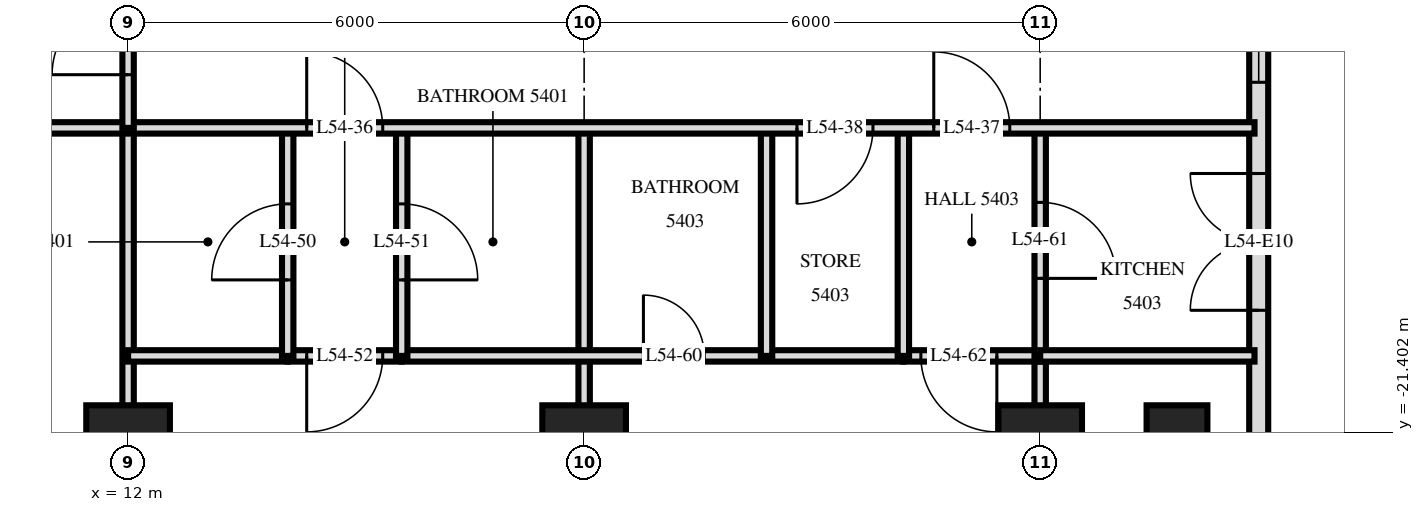
"""IFC4 building model, lengths in metres.
Left out: names, types, materials, properties, quantities, classifications, styles, units other than length and angle.
Written with IfcOpenShell. Run it as: python <this file> out.ifc"""

import sys

from ifc_helpers import new_model, si_unit, direction, frame, frame_2d, origin, origin_2d, place, context, subcontext, project, spatial, rectangle, extrude, element, fill, save


model = new_model("IFC4")
c1 = context("Model", 3, precision=1e-05, world=origin(), true_north=direction((0.0, 1.0)))
c2 = subcontext(c1, "Body", "Model", "MODEL_VIEW")
j1 = project(units=[si_unit("LENGTHUNIT", "METRE"), si_unit("PLANEANGLEUNIT", "RADIAN")], contexts=[c1])
p1 = place(None, origin())
s1 = spatial("IfcSite", under=j1, at=p1, CompositionType="ELEMENT")
p2 = place(p1, origin())
s2 = spatial("IfcBuilding", under=s1, at=p2, CompositionType="ELEMENT")
p3 = place(p2, frame((0.0, 0.0, 208.1)))
s3 = spatial("IfcBuildingStorey", under=s2, at=p3, CompositionType="ELEMENT", Elevation=208.1)
for number, where, z_axis, x_axis in (
    (1, (12.0, -21.6, 0.0), (0.0, 0.0, 1.0), (1.0, 0.0, 0.0)),
    (2, (18.0, -21.6, 0.0), (0.0, 0.0, 1.0), (1.0, 0.0, 0.0)),
    (3, (24.0, -21.6, 0.0), (0.0, 0.0, 1.0), (1.0, 0.0, 0.0)),
):
    element("IfcColumn", number, at=place(p3, frame(where, z_axis=z_axis, x_axis=x_axis)), inside=s3, PredefinedType="COLUMN", context=c2, shape_type="SweptSolid", body=[
        extrude(rectangle(XDim=1.1, YDim=1.1, at=origin_2d()), origin(), (0.0, 0.0, 1.0), 3.5),
    ])
p4 = place(p3, frame((25.8, -21.6, 0.0), z_axis=(0.0, 0.0, 1.0), x_axis=(0.0, 1.0, 0.0)))
e4 = element("IfcColumn", 4, at=p4, inside=s3, PredefinedType="COLUMN", context=c2, shape_type="SweptSolid", body=[
    extrude(rectangle(XDim=1.1, YDim=0.8, at=origin_2d()), origin(), (0.0, 0.0, 1.0), 3.5),
])
p5 = place(p3, frame((26.875, -24.875, 0.0), z_axis=(0.0, 0.0, 1.0), x_axis=(0.0, 1.0, 0.0)))
e5 = element("IfcWall", 5, at=p5, inside=s3, PredefinedType="SOLIDWALL", context=c2, shape_type="SweptSolid", body=[
    extrude(rectangle(XDim=21.551, YDim=0.25, at=frame_2d((10.775, 0.0))), origin(), (0.0, 0.0, 1.0), 3.22),
])
p6 = place(p5, frame((0.575, 0.0, 0.0)))
e6 = element("IfcOpeningElement", 6, at=p6, cuts=e5, PredefinedType="OPENING", context=c2, shape_type="SweptSolid", body=[
    extrude(rectangle(XDim=1.8, YDim=2.4, at=frame_2d((0.9, 1.2))), frame((0.0, 0.135, 0.0), z_axis=(0.0, -1.0, 0.0), x_axis=(1.0, 0.0, 0.0)), (0.0, 0.0, 1.0), 0.27),
])
p7 = place(p5, frame((5.075, 0.0, 0.0)))
e7 = element("IfcOpeningElement", 7, at=p7, cuts=e5, PredefinedType="OPENING", context=c2, shape_type="SweptSolid", body=[
    extrude(rectangle(XDim=1.8, YDim=2.4, at=frame_2d((0.9, 1.2))), frame((0.0, 0.135, 0.0), z_axis=(0.0, -1.0, 0.0), x_axis=(1.0, 0.0, 0.0)), (0.0, 0.0, 1.0), 0.27),
])
p8 = place(p5, frame((8.075, 0.0, 0.9)))
e8 = element("IfcOpeningElement", 8, at=p8, cuts=e5, PredefinedType="OPENING", context=c2, shape_type="SweptSolid", body=[
    extrude(rectangle(XDim=1.2, YDim=1.5, at=frame_2d((0.6, 0.75))), frame((0.0, 0.135, 0.0), z_axis=(0.0, -1.0, 0.0), x_axis=(1.0, 0.0, 0.0)), (0.0, 0.0, 1.0), 0.27),
])
p9 = place(p5, frame((13.1, 0.0, 0.0)))
e9 = element("IfcOpeningElement", 9, at=p9, cuts=e5, PredefinedType="OPENING", context=c2, shape_type="SweptSolid", body=[
    extrude(rectangle(XDim=1.8, YDim=2.4, at=frame_2d((0.9, 1.2))), frame((0.0, 0.135, 0.0), z_axis=(0.0, -1.0, 0.0), x_axis=(1.0, 0.0, 0.0)), (0.0, 0.0, 1.0), 0.27),
])
p10 = place(p3, frame((24.0, -20.4, 0.0), z_axis=(0.0, 0.0, 1.0), x_axis=(0.0, 1.0, 0.0)))
e10 = element("IfcWall", 10, at=p10, inside=s3, PredefinedType="PARTITIONING", context=c2, shape_type="SweptSolid", body=[
    extrude(rectangle(XDim=3.0, YDim=0.15, at=frame_2d((1.5, 0.0))), origin(), (0.0, 0.0, 1.0), 3.22),
])
p11 = place(p10, frame((1.02, 0.0, 0.0)))
e11 = element("IfcOpeningElement", 11, at=p11, cuts=e10, PredefinedType="OPENING", context=c2, shape_type="SweptSolid", body=[
    extrude(rectangle(XDim=1.0, YDim=2.1, at=frame_2d((0.5, 1.05))), frame((0.0, 0.085, 0.0), z_axis=(0.0, -1.0, 0.0), x_axis=(1.0, 0.0, 0.0)), (0.0, 0.0, 1.0), 0.17),
])
p12 = place(p3, frame((24.0, -28.918, 0.0), z_axis=(0.0, 0.0, 1.0), x_axis=(0.0, 1.0, 0.0)))
e12 = element("IfcWall", 12, at=p12, inside=s3, PredefinedType="PARTITIONING", context=c2, shape_type="SweptSolid", body=[
    extrude(rectangle(XDim=8.518, YDim=0.15, at=frame_2d((4.259, 0.0))), origin(), (0.0, 0.0, 1.0), 3.22),
])
p13 = place(p12, frame((3.698, 0.0, 0.0)))
e13 = element("IfcOpeningElement", 13, at=p13, cuts=e12, PredefinedType="OPENING", context=c2, shape_type="SweptSolid", body=[
    extrude(rectangle(XDim=0.9, YDim=2.1, at=frame_2d((0.45, 1.05))), frame((0.0, 0.085, 0.0), z_axis=(0.0, -1.0, 0.0), x_axis=(1.0, 0.0, 0.0)), (0.0, 0.0, 1.0), 0.17),
])
for number, where, z_axis, x_axis in (
    (14, (22.2, -20.4, 0.0), (0.0, 0.0, 1.0), (0.0, 1.0, 0.0)),
    (15, (20.4, -20.4, 0.0), (0.0, 0.0, 1.0), (0.0, 1.0, 0.0)),
):
    element("IfcWall", number, at=place(p3, frame(where, z_axis=z_axis, x_axis=x_axis)), inside=s3, PredefinedType="PARTITIONING", context=c2, shape_type="SweptSolid", body=[
        extrude(rectangle(XDim=3.0, YDim=0.15, at=frame_2d((1.5, 0.0))), origin(), (0.0, 0.0, 1.0), 3.22),
    ])
p14 = place(p3, frame((18.0, -29.22, 0.0), z_axis=(0.0, 0.0, 1.0), x_axis=(0.0, 1.0, 0.0)))
e16 = element("IfcWall", 16, at=p14, inside=s3, PredefinedType="PARTITIONING", context=c2, shape_type="SweptSolid", body=[
    extrude(rectangle(XDim=11.82, YDim=0.15, at=frame_2d((5.91, 0.0))), origin(), (0.0, 0.0, 1.0), 3.22),
])
p15 = place(p3, frame((15.6, -20.4, 0.0), z_axis=(0.0, 0.0, 1.0), x_axis=(0.0, 1.0, 0.0)))
e17 = element("IfcWall", 17, at=p15, inside=s3, PredefinedType="PARTITIONING", context=c2, shape_type="SweptSolid", body=[
    extrude(rectangle(XDim=3.0, YDim=0.15, at=frame_2d((1.5, 0.0))), origin(), (0.0, 0.0, 1.0), 3.22),
])
p16 = place(p15, frame((1.0, 0.0, 0.0)))
e18 = element("IfcOpeningElement", 18, at=p16, cuts=e17, PredefinedType="OPENING", context=c2, shape_type="SweptSolid", body=[
    extrude(rectangle(XDim=1.0, YDim=2.1, at=frame_2d((0.5, 1.05))), frame((0.0, 0.085, 0.0), z_axis=(0.0, -1.0, 0.0), x_axis=(1.0, 0.0, 0.0)), (0.0, 0.0, 1.0), 0.17),
])
p17 = place(p3, frame((14.1, -20.4, 0.0), z_axis=(0.0, 0.0, 1.0), x_axis=(0.0, 1.0, 0.0)))
e19 = element("IfcWall", 19, at=p17, inside=s3, PredefinedType="PARTITIONING", context=c2, shape_type="SweptSolid", body=[
    extrude(rectangle(XDim=3.0, YDim=0.15, at=frame_2d((1.5, 0.0))), origin(), (0.0, 0.0, 1.0), 3.22),
])
p18 = place(p17, frame((1.0, 0.0, 0.0)))
e20 = element("IfcOpeningElement", 20, at=p18, cuts=e19, PredefinedType="OPENING", context=c2, shape_type="SweptSolid", body=[
    extrude(rectangle(XDim=1.0, YDim=2.1, at=frame_2d((0.5, 1.05))), frame((0.0, 0.085, 0.0), z_axis=(0.0, -1.0, 0.0), x_axis=(1.0, 0.0, 0.0)), (0.0, 0.0, 1.0), 0.17),
])
p19 = place(p3, frame((12.0, -17.4, 0.0), z_axis=(0.0, 0.0, 1.0), x_axis=(0.0, 1.0, 0.0)))
e21 = element("IfcWall", 21, at=p19, inside=s3, PredefinedType="PARTITIONING", context=c2, shape_type="SweptSolid", body=[
    extrude(rectangle(XDim=2.35, YDim=0.15, at=frame_2d((1.175, 0.0))), origin(), (0.0, 0.0, 1.0), 3.22),
])
p20 = place(p19, frame((0.7, 0.0, 0.0)))
e22 = element("IfcOpeningElement", 22, at=p20, cuts=e21, PredefinedType="OPENING", context=c2, shape_type="SweptSolid", body=[
    extrude(rectangle(XDim=1.0, YDim=2.1, at=frame_2d((0.5, 1.05))), frame((0.0, 0.085, 0.0), z_axis=(0.0, -1.0, 0.0), x_axis=(1.0, 0.0, 0.0)), (0.0, 0.0, 1.0), 0.17),
])
p21 = place(p3, frame((12.0, -29.22, 0.0), z_axis=(0.0, 0.0, 1.0), x_axis=(0.0, 1.0, 0.0)))
e23 = element("IfcWall", 23, at=p21, inside=s3, PredefinedType="PARTITIONING", context=c2, shape_type="SweptSolid", body=[
    extrude(rectangle(XDim=11.82, YDim=0.15, at=frame_2d((5.91, 0.0))), origin(), (0.0, 0.0, 1.0), 3.22),
])
p22 = place(p3, frame((14.1, -20.4, 0.0), z_axis=(0.0, 0.0, 1.0), x_axis=(1.0, 0.0, 0.0)))
e24 = element("IfcWall", 24, at=p22, inside=s3, PredefinedType="PARTITIONING", context=c2, shape_type="SweptSolid", body=[
    extrude(rectangle(XDim=1.5, YDim=0.15, at=frame_2d((0.75, 0.0))), origin(), (0.0, 0.0, 1.0), 3.22),
])
p23 = place(p22, frame((0.25, 0.0, 0.0)))
e25 = element("IfcOpeningElement", 25, at=p23, cuts=e24, PredefinedType="OPENING", context=c2, shape_type="SweptSolid", body=[
    extrude(rectangle(XDim=1.0, YDim=2.1, at=frame_2d((0.5, 1.05))), frame((0.0, 0.085, 0.0), z_axis=(0.0, -1.0, 0.0), x_axis=(1.0, 0.0, 0.0)), (0.0, 0.0, 1.0), 0.17),
])
p24 = place(p3, frame((22.2, -20.4, 0.0), z_axis=(0.0, 0.0, 1.0), x_axis=(1.0, 0.0, 0.0)))
e26 = element("IfcWall", 26, at=p24, inside=s3, PredefinedType="PARTITIONING", context=c2, shape_type="SweptSolid", body=[
    extrude(rectangle(XDim=1.8, YDim=0.15, at=frame_2d((0.9, 0.0))), origin(), (0.0, 0.0, 1.0), 3.22),
])
p25 = place(p24, frame((0.23, 0.0, 0.0)))
e27 = element("IfcOpeningElement", 27, at=p25, cuts=e26, PredefinedType="OPENING", context=c2, shape_type="SweptSolid", body=[
    extrude(rectangle(XDim=1.0, YDim=2.1, at=frame_2d((0.5, 1.05))), frame((0.0, 0.085, 0.0), z_axis=(0.0, -1.0, 0.0), x_axis=(1.0, 0.0, 0.0)), (0.0, 0.0, 1.0), 0.17),
])
p26 = place(p3, frame((12.0, -20.4, 0.0), z_axis=(0.0, 0.0, 1.0), x_axis=(1.0, 0.0, 0.0)))
e28 = element("IfcWall", 28, at=p26, inside=s3, PredefinedType="PARTITIONING", context=c2, shape_type="SweptSolid", body=[
    extrude(rectangle(XDim=2.1, YDim=0.15, at=frame_2d((1.05, 0.0))), origin(), (0.0, 0.0, 1.0), 3.22),
])
p27 = place(p3, frame((15.6, -20.4, 0.0), z_axis=(0.0, 0.0, 1.0), x_axis=(1.0, 0.0, 0.0)))
e29 = element("IfcWall", 29, at=p27, inside=s3, PredefinedType="PARTITIONING", context=c2, shape_type="SweptSolid", body=[
    extrude(rectangle(XDim=6.6, YDim=0.15, at=frame_2d((3.3, 0.0))), origin(), (0.0, 0.0, 1.0), 3.22),
])
p28 = place(p27, frame((3.18, 0.0, 0.0)))
e30 = element("IfcOpeningElement", 30, at=p28, cuts=e29, PredefinedType="OPENING", context=c2, shape_type="SweptSolid", body=[
    extrude(rectangle(XDim=0.8, YDim=2.1, at=frame_2d((0.4, 1.05))), frame((0.0, 0.085, 0.0), z_axis=(0.0, -1.0, 0.0), x_axis=(1.0, 0.0, 0.0)), (0.0, 0.0, 1.0), 0.17),
])
p29 = place(p3, frame((24.0, -20.4, 0.0), z_axis=(0.0, 0.0, 1.0), x_axis=(1.0, 0.0, 0.0)))
e31 = element("IfcWall", 31, at=p29, inside=s3, PredefinedType="PARTITIONING", context=c2, shape_type="SweptSolid", body=[
    extrude(rectangle(XDim=2.82, YDim=0.15, at=frame_2d((1.41, 0.0))), origin(), (0.0, 0.0, 1.0), 3.22),
])
p30 = place(p3, frame((-26.82, -17.4, 0.0), z_axis=(0.0, 0.0, 1.0), x_axis=(1.0, 0.0, 0.0)))
e32 = element("IfcWall", 32, at=p30, inside=s3, PredefinedType="PARTITIONING", context=c2, shape_type="SweptSolid", body=[
    extrude(rectangle(XDim=53.64, YDim=0.15, at=frame_2d((26.82, 0.0))), origin(), (0.0, 0.0, 1.0), 3.22),
])
p31 = place(p30, frame((4.92, 0.0, 0.0)))
e33 = element("IfcOpeningElement", 33, at=p31, cuts=e32, PredefinedType="OPENING", context=c2, shape_type="SweptSolid", body=[
    extrude(rectangle(XDim=1.0, YDim=2.1, at=frame_2d((0.5, 1.05))), frame((0.0, 0.085, 0.0), z_axis=(0.0, -1.0, 0.0), x_axis=(1.0, 0.0, 0.0)), (0.0, 0.0, 1.0), 0.17),
])
p32 = place(p30, frame((1.62, 0.0, 0.0)))
e34 = element("IfcOpeningElement", 34, at=p32, cuts=e32, PredefinedType="OPENING", context=c2, shape_type="SweptSolid", body=[
    extrude(rectangle(XDim=1.0, YDim=2.1, at=frame_2d((0.5, 1.05))), frame((0.0, 0.085, 0.0), z_axis=(0.0, -1.0, 0.0), x_axis=(1.0, 0.0, 0.0)), (0.0, 0.0, 1.0), 0.17),
])
p33 = place(p30, frame((41.17, 0.0, 0.0)))
e35 = element("IfcOpeningElement", 35, at=p33, cuts=e32, PredefinedType="OPENING", context=c2, shape_type="SweptSolid", body=[
    extrude(rectangle(XDim=1.0, YDim=2.1, at=frame_2d((0.5, 1.05))), frame((0.0, 0.085, 0.0), z_axis=(0.0, -1.0, 0.0), x_axis=(1.0, 0.0, 0.0)), (0.0, 0.0, 1.0), 0.17),
])
p34 = place(p30, frame((49.42, 0.0, 0.0)))
e36 = element("IfcOpeningElement", 36, at=p34, cuts=e32, PredefinedType="OPENING", context=c2, shape_type="SweptSolid", body=[
    extrude(rectangle(XDim=1.0, YDim=2.1, at=frame_2d((0.5, 1.05))), frame((0.0, 0.085, 0.0), z_axis=(0.0, -1.0, 0.0), x_axis=(1.0, 0.0, 0.0)), (0.0, 0.0, 1.0), 0.17),
])
p35 = place(p30, frame((47.62, 0.0, 0.0)))
e37 = element("IfcOpeningElement", 37, at=p35, cuts=e32, PredefinedType="OPENING", context=c2, shape_type="SweptSolid", body=[
    extrude(rectangle(XDim=1.0, YDim=2.1, at=frame_2d((0.5, 1.05))), frame((0.0, 0.085, 0.0), z_axis=(0.0, -1.0, 0.0), x_axis=(1.0, 0.0, 0.0)), (0.0, 0.0, 1.0), 0.17),
])
p36 = place(p30, frame((21.82, 0.0, 0.0)))
e38 = element("IfcOpeningElement", 38, at=p36, cuts=e32, PredefinedType="OPENING", context=c2, shape_type="SweptSolid", body=[
    extrude(rectangle(XDim=1.0, YDim=2.1, at=frame_2d((0.5, 1.05))), frame((0.0, 0.085, 0.0), z_axis=(0.0, -1.0, 0.0), x_axis=(1.0, 0.0, 0.0)), (0.0, 0.0, 1.0), 0.17),
])
p37 = place(p30, frame((33.82, 0.0, 0.0)))
e39 = element("IfcOpeningElement", 39, at=p37, cuts=e32, PredefinedType="OPENING", context=c2, shape_type="SweptSolid", body=[
    extrude(rectangle(XDim=1.0, YDim=2.1, at=frame_2d((0.5, 1.05))), frame((0.0, 0.085, 0.0), z_axis=(0.0, -1.0, 0.0), x_axis=(1.0, 0.0, 0.0)), (0.0, 0.0, 1.0), 0.17),
])
p38 = place(p7, origin())
e40 = element("IfcDoor", 40, at=p38, inside=s3, OperationType="DOUBLE_DOOR_SINGLE_SWING", PredefinedType="DOOR", context=c2, shape_type="SweptSolid", body=[
    extrude(rectangle(XDim=1.8, YDim=2.4, at=frame_2d((0.9, 1.2))), frame((0.0, 0.025, 0.0), z_axis=(0.0, -1.0, 0.0), x_axis=(1.0, 0.0, 0.0)), (0.0, 0.0, 1.0), 0.05),
])
fill(e7, e40)
p39 = place(p8, origin())
e41 = element("IfcWindow", 41, at=p39, inside=s3, PartitioningType="SINGLE_PANEL", PredefinedType="WINDOW", context=c2, shape_type="SweptSolid", body=[
    extrude(rectangle(XDim=1.2, YDim=1.5, at=frame_2d((0.6, 0.75))), frame((0.0, 0.03, 0.0), z_axis=(0.0, -1.0, 0.0), x_axis=(1.0, 0.0, 0.0)), (0.0, 0.0, 1.0), 0.06),
])
fill(e8, e41)
p40 = place(p20, origin())
e42 = element("IfcDoor", 42, at=p40, inside=s3, OperationType="SINGLE_SWING_RIGHT", PredefinedType="DOOR", context=c2, shape_type="SweptSolid", body=[
    extrude(rectangle(XDim=1.0, YDim=2.1, at=frame_2d((0.5, 1.05))), frame((0.0, 0.025, 0.0), z_axis=(0.0, -1.0, 0.0), x_axis=(1.0, 0.0, 0.0)), (0.0, 0.0, 1.0), 0.05),
])
fill(e22, e42)
p41 = place(p33, origin())
e43 = element("IfcDoor", 43, at=p41, inside=s3, OperationType="SINGLE_SWING_RIGHT", PredefinedType="DOOR", context=c2, shape_type="SweptSolid", body=[
    extrude(rectangle(XDim=1.0, YDim=2.1, at=frame_2d((0.5, 1.05))), frame((0.0, 0.025, 0.0), z_axis=(0.0, -1.0, 0.0), x_axis=(1.0, 0.0, 0.0)), (0.0, 0.0, 1.0), 0.05),
])
fill(e35, e43)
p42 = place(p34, origin())
e44 = element("IfcDoor", 44, at=p42, inside=s3, OperationType="SINGLE_SWING_RIGHT", PredefinedType="DOOR", context=c2, shape_type="SweptSolid", body=[
    extrude(rectangle(XDim=1.0, YDim=2.1, at=frame_2d((0.5, 1.05))), frame((0.0, 0.025, 0.0), z_axis=(0.0, -1.0, 0.0), x_axis=(1.0, 0.0, 0.0)), (0.0, 0.0, 1.0), 0.05),
])
fill(e36, e44)
p43 = place(p35, frame((0.5, 0.0, 0.0), z_axis=(0.0, 0.0, 1.0), x_axis=(-1.0, 0.0, 0.0)))
e45 = element("IfcDoor", 45, at=p43, inside=s3, OperationType="SINGLE_SWING_LEFT", PredefinedType="DOOR", context=c2, shape_type="SweptSolid", body=[
    extrude(rectangle(XDim=1.0, YDim=2.1, at=frame_2d((0.0, 1.05))), frame((0.0, -0.025, 0.0), z_axis=(0.0, 1.0, 0.0), x_axis=(-1.0, 0.0, 0.0)), (0.0, 0.0, 1.0), 0.05),
])
fill(e37, e45)
p44 = place(p18, origin())
e46 = element("IfcDoor", 46, at=p44, inside=s3, OperationType="SINGLE_SWING_RIGHT", PredefinedType="DOOR", context=c2, shape_type="SweptSolid", body=[
    extrude(rectangle(XDim=1.0, YDim=2.1, at=frame_2d((0.5, 1.05))), frame((0.0, 0.025, 0.0), z_axis=(0.0, -1.0, 0.0), x_axis=(1.0, 0.0, 0.0)), (0.0, 0.0, 1.0), 0.05),
])
fill(e20, e46)
p45 = place(p16, frame((0.5, 0.0, 0.0), z_axis=(0.0, 0.0, 1.0), x_axis=(-1.0, 0.0, 0.0)))
e47 = element("IfcDoor", 47, at=p45, inside=s3, OperationType="SINGLE_SWING_LEFT", PredefinedType="DOOR", context=c2, shape_type="SweptSolid", body=[
    extrude(rectangle(XDim=1.0, YDim=2.1, at=frame_2d((0.0, 1.05))), frame((0.0, -0.025, 0.0), z_axis=(0.0, 1.0, 0.0), x_axis=(-1.0, 0.0, 0.0)), (0.0, 0.0, 1.0), 0.05),
])
fill(e18, e47)
p46 = place(p23, frame((0.5, 0.0, 0.0), z_axis=(0.0, 0.0, 1.0), x_axis=(-1.0, 0.0, 0.0)))
e48 = element("IfcDoor", 48, at=p46, inside=s3, OperationType="SINGLE_SWING_LEFT", PredefinedType="DOOR", context=c2, shape_type="SweptSolid", body=[
    extrude(rectangle(XDim=1.0, YDim=2.1, at=frame_2d((0.0, 1.05))), frame((0.0, -0.025, 0.0), z_axis=(0.0, 1.0, 0.0), x_axis=(-1.0, 0.0, 0.0)), (0.0, 0.0, 1.0), 0.05),
])
fill(e25, e48)
p47 = place(p28, origin())
e49 = element("IfcDoor", 49, at=p47, inside=s3, OperationType="SINGLE_SWING_RIGHT", PredefinedType="DOOR", context=c2, shape_type="SweptSolid", body=[
    extrude(rectangle(XDim=0.8, YDim=2.1, at=frame_2d((0.4, 1.05))), frame((0.0, 0.025, 0.0), z_axis=(0.0, -1.0, 0.0), x_axis=(1.0, 0.0, 0.0)), (0.0, 0.0, 1.0), 0.05),
])
fill(e30, e49)
p48 = place(p11, frame((0.5, 0.0, 0.0), z_axis=(0.0, 0.0, 1.0), x_axis=(-1.0, 0.0, 0.0)))
e50 = element("IfcDoor", 50, at=p48, inside=s3, OperationType="SINGLE_SWING_LEFT", PredefinedType="DOOR", context=c2, shape_type="SweptSolid", body=[
    extrude(rectangle(XDim=1.0, YDim=2.1, at=frame_2d((0.0, 1.05))), frame((0.0, -0.025, 0.0), z_axis=(0.0, 1.0, 0.0), x_axis=(-1.0, 0.0, 0.0)), (0.0, 0.0, 1.0), 0.05),
])
fill(e11, e50)
p49 = place(p25, frame((0.5, 0.0, 0.0), z_axis=(0.0, 0.0, 1.0), x_axis=(-1.0, 0.0, 0.0)))
e51 = element("IfcDoor", 51, at=p49, inside=s3, OperationType="SINGLE_SWING_RIGHT", PredefinedType="DOOR", context=c2, shape_type="SweptSolid", body=[
    extrude(rectangle(XDim=1.0, YDim=2.1, at=frame_2d((0.0, 1.05))), frame((0.0, -0.025, 0.0), z_axis=(0.0, 1.0, 0.0), x_axis=(-1.0, 0.0, 0.0)), (0.0, 0.0, 1.0), 0.05),
])
fill(e27, e51)
save(model, sys.argv[1])
